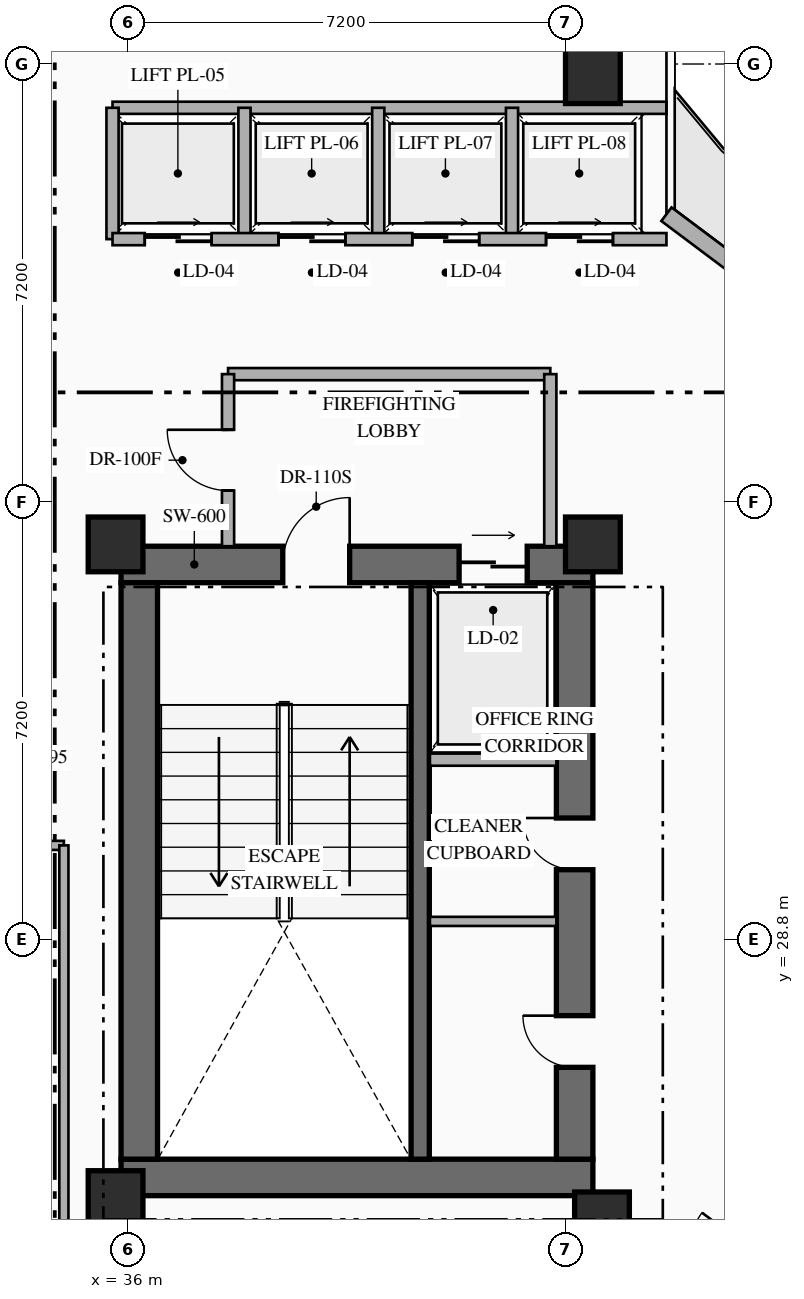
"""IFC4 building model, lengths in metres.
Left out: names, types, materials, properties, quantities, classifications, styles, units other than length and angle.
Written with IfcOpenShell. Run it as: python <this file> out.ifc"""

import sys

from ifc_helpers import new_model, si_unit, direction, frame, frame_2d, origin, origin_2d, place, context, subcontext, project, spatial, rectangle, extrude, element, fill, save


model = new_model("IFC4")
c1 = context("Model", 3, precision=1e-05, world=origin(), true_north=direction((0.0, 1.0)))
c2 = subcontext(c1, "Body", "Model", "MODEL_VIEW")
j1 = project(units=[si_unit("LENGTHUNIT", "METRE"), si_unit("PLANEANGLEUNIT", "RADIAN")], contexts=[c1])
p1 = place(None, origin())
s1 = spatial("IfcSite", under=j1, at=p1, CompositionType="ELEMENT")
p2 = place(p1, origin())
s2 = spatial("IfcBuilding", under=s1, at=p2, CompositionType="ELEMENT")
p3 = place(p2, frame((0.0, 0.0, 108.45)))
s3 = spatial("IfcBuildingStorey", under=s2, at=p3, CompositionType="ELEMENT", Elevation=108.45)
p4 = place(p3, frame((35.89, 24.89, 0.0), z_axis=(0.0, 0.0, 1.0), x_axis=(1.0, 0.0, 0.0)))
e1 = element("IfcWall", 1, at=p4, inside=s3, PredefinedType="SHEAR", context=c2, shape_type="SweptSolid", body=[
    extrude(rectangle(XDim=7.76, YDim=0.6, at=frame_2d((3.88, 0.0))), origin(), (0.0, 0.0, 1.0), 3.6),
])
p5 = place(p3, frame((35.89, 34.97, 0.0), z_axis=(0.0, 0.0, 1.0), x_axis=(1.0, 0.0, 0.0)))
e2 = element("IfcWall", 2, at=p5, inside=s3, PredefinedType="SHEAR", context=c2, shape_type="SweptSolid", body=[
    extrude(rectangle(XDim=7.76, YDim=0.6, at=frame_2d((3.88, 0.0))), origin(), (0.0, 0.0, 1.0), 3.6),
])
p6 = place(p5, frame((2.66, 0.0, 0.0)))
e3 = element("IfcOpeningElement", 3, at=p6, cuts=e2, PredefinedType="OPENING", context=c2, shape_type="SweptSolid", body=[
    extrude(rectangle(XDim=1.1, YDim=2.2, at=frame_2d((0.55, 1.1))), frame((0.0, 0.31, 0.0), z_axis=(0.0, -1.0, 0.0), x_axis=(1.0, 0.0, 0.0)), (0.0, 0.0, 1.0), 0.62),
])
p7 = place(p5, frame((5.56, 0.0, 0.0)))
e4 = element("IfcOpeningElement", 4, at=p7, cuts=e2, PredefinedType="OPENING", context=c2, shape_type="SweptSolid", body=[
    extrude(rectangle(XDim=1.12, YDim=2.15, at=frame_2d((0.56, 1.075))), frame((0.0, 0.31, 0.0), z_axis=(0.0, -1.0, 0.0), x_axis=(1.0, 0.0, 0.0)), (0.0, 0.0, 1.0), 0.62),
])
p8 = place(p3, frame((36.19, 25.19, 0.0), z_axis=(0.0, 0.0, 1.0), x_axis=(0.0, 1.0, 0.0)))
e5 = element("IfcWall", 5, at=p8, inside=s3, PredefinedType="SHEAR", context=c2, shape_type="SweptSolid", body=[
    extrude(rectangle(XDim=9.48, YDim=0.6, at=frame_2d((4.74, 0.0))), origin(), (0.0, 0.0, 1.0), 3.6),
])
p9 = place(p3, frame((43.35, 25.19, 0.0), z_axis=(0.0, 0.0, 1.0), x_axis=(0.0, 1.0, 0.0)))
e6 = element("IfcWall", 6, at=p9, inside=s3, PredefinedType="SHEAR", context=c2, shape_type="SweptSolid", body=[
    extrude(rectangle(XDim=9.48, YDim=0.6, at=frame_2d((4.74, 0.0))), origin(), (0.0, 0.0, 1.0), 3.6),
])
p10 = place(p9, frame((1.51, 0.0, 0.0)))
e7 = element("IfcOpeningElement", 7, at=p10, cuts=e6, PredefinedType="OPENING", context=c2, shape_type="SweptSolid", body=[
    extrude(rectangle(XDim=0.85, YDim=2.08, at=frame_2d((0.425, 1.04))), frame((0.0, 0.31, 0.0), z_axis=(0.0, -1.0, 0.0), x_axis=(1.0, 0.0, 0.0)), (0.0, 0.0, 1.0), 0.62),
])
p11 = place(p9, frame((4.76, 0.0, 0.0)))
e8 = element("IfcOpeningElement", 8, at=p11, cuts=e6, PredefinedType="OPENING", context=c2, shape_type="SweptSolid", body=[
    extrude(rectangle(XDim=0.85, YDim=2.08, at=frame_2d((0.425, 1.04))), frame((0.0, 0.31, 0.0), z_axis=(0.0, -1.0, 0.0), x_axis=(1.0, 0.0, 0.0)), (0.0, 0.0, 1.0), 0.62),
])
p12 = place(p3, frame((40.81, 25.19, 0.0), z_axis=(0.0, 0.0, 1.0), x_axis=(0.0, 1.0, 0.0)))
e9 = element("IfcWall", 9, at=p12, inside=s3, PredefinedType="SHEAR", context=c2, shape_type="SweptSolid", body=[
    extrude(rectangle(XDim=9.48, YDim=0.3, at=frame_2d((4.74, 0.0))), origin(), (0.0, 0.0, 1.0), 3.6),
])
for number, where, z_axis, x_axis in (
    (10, (35.8, 24.55, 0.0), (0.0, 0.0, 1.0), (1.0, 0.0, 0.0)),
    (11, (43.8, 24.2, 0.0), (0.0, 0.0, 1.0), (1.0, 0.0, 0.0)),
    (12, (35.8, 35.3, 0.0), (0.0, 0.0, 1.0), (1.0, 0.0, 0.0)),
    (13, (43.65, 35.3, 0.0), (0.0, 0.0, 1.0), (1.0, 0.0, 0.0)),
    (14, (43.65, 43.0, 0.0), (0.0, 0.0, 1.0), (1.0, 0.0, 0.0)),
):
    element("IfcColumn", number, at=place(p3, frame(where, z_axis=z_axis, x_axis=x_axis)), inside=s3, PredefinedType="COLUMN", context=c2, shape_type="SweptSolid", body=[
        extrude(rectangle(XDim=0.9, YDim=0.9, at=origin_2d()), origin(), (0.0, 0.0, 1.0), 3.6),
    ])
p13 = place(p3, frame((44.86, 40.73, 0.0), z_axis=(0.0, 0.0, 1.0), x_axis=(0.800006902154, -0.599990797017, 0.0)))
e15 = element("IfcWall", 15, at=p13, inside=s3, PredefinedType="STANDARD", context=c2, shape_type="SweptSolid", body=[
    extrude(rectangle(XDim=29.712, YDim=0.28, at=frame_2d((14.856, 0.0))), origin(), (0.0, 0.0, 1.0), 3.35),
])
p14 = place(p13, frame((14.249, 0.0, 0.0)))
e16 = element("IfcOpeningElement", 16, at=p14, cuts=e15, PredefinedType="OPENING", context=c2, shape_type="SweptSolid", body=[
    extrude(rectangle(XDim=1.1, YDim=2.2, at=frame_2d((0.55, 1.1))), frame((0.0, 0.15, 0.0), z_axis=(0.0, -1.0, 0.0), x_axis=(1.0, 0.0, 0.0)), (0.0, 0.0, 1.0), 0.3),
])
p15 = place(p13, frame((6.528, 0.0, 0.85)))
e17 = element("IfcOpeningElement", 17, at=p15, cuts=e15, PredefinedType="OPENING", context=c2, shape_type="SweptSolid", body=[
    extrude(rectangle(XDim=1.8, YDim=2.1, at=frame_2d((0.9, 1.05))), frame((0.0, 0.15, 0.0), z_axis=(0.0, -1.0, 0.0), x_axis=(1.0, 0.0, 0.0)), (0.0, 0.0, 1.0), 0.3),
])
p16 = place(p13, frame((21.384, 0.0, 0.85)))
e18 = element("IfcOpeningElement", 18, at=p16, cuts=e15, PredefinedType="OPENING", context=c2, shape_type="SweptSolid", body=[
    extrude(rectangle(XDim=1.8, YDim=2.1, at=frame_2d((0.9, 1.05))), frame((0.0, 0.15, 0.0), z_axis=(0.0, -1.0, 0.0), x_axis=(1.0, 0.0, 0.0)), (0.0, 0.0, 1.0), 0.3),
])
p17 = place(p3, frame((40.97, 31.76, 0.0), z_axis=(0.0, 0.0, 1.0), x_axis=(1.0, 0.0, 0.0)))
e19 = element("IfcWall", 19, at=p17, inside=s3, PredefinedType="STANDARD", context=c2, shape_type="SweptSolid", body=[
    extrude(rectangle(XDim=2.08, YDim=0.2, at=frame_2d((1.04, 0.0))), origin(), (0.0, 0.0, 1.0), 3.35),
])
p18 = place(p3, frame((40.97, 29.1, 0.0), z_axis=(0.0, 0.0, 1.0), x_axis=(1.0, 0.0, 0.0)))
e20 = element("IfcWall", 20, at=p18, inside=s3, PredefinedType="PARTITIONING", context=c2, shape_type="SweptSolid", body=[
    extrude(rectangle(XDim=2.08, YDim=0.15, at=frame_2d((1.04, 0.0))), origin(), (0.0, 0.0, 1.0), 3.35),
])
p19 = place(p3, frame((37.65, 38.1, 0.0), z_axis=(0.0, 0.0, 1.0), x_axis=(1.0, 0.0, 0.0)))
e21 = element("IfcWall", 21, at=p19, inside=s3, PredefinedType="STANDARD", context=c2, shape_type="SweptSolid", body=[
    extrude(rectangle(XDim=5.3, YDim=0.2, at=frame_2d((2.65, 0.0))), origin(), (0.0, 0.0, 1.0), 3.35),
])
p20 = place(p3, frame((42.95, 35.27, 0.0), z_axis=(0.0, 0.0, 1.0), x_axis=(0.0, 1.0, 0.0)))
e22 = element("IfcWall", 22, at=p20, inside=s3, PredefinedType="STANDARD", context=c2, shape_type="SweptSolid", body=[
    extrude(rectangle(XDim=2.83, YDim=0.2, at=frame_2d((1.415, 0.0))), origin(), (0.0, 0.0, 1.0), 3.35),
])
p21 = place(p3, frame((37.65, 35.27, 0.0), z_axis=(0.0, 0.0, 1.0), x_axis=(0.0, 1.0, 0.0)))
e23 = element("IfcWall", 23, at=p21, inside=s3, PredefinedType="STANDARD", context=c2, shape_type="SweptSolid", body=[
    extrude(rectangle(XDim=2.83, YDim=0.2, at=frame_2d((1.415, 0.0))), origin(), (0.0, 0.0, 1.0), 3.35),
])
p22 = place(p21, frame((0.915, 0.0, 0.0)))
e24 = element("IfcOpeningElement", 24, at=p22, cuts=e23, PredefinedType="OPENING", context=c2, shape_type="SweptSolid", body=[
    extrude(rectangle(XDim=1.0, YDim=2.2, at=frame_2d((0.5, 1.1))), frame((0.0, 0.11, 0.0), z_axis=(0.0, -1.0, 0.0), x_axis=(1.0, 0.0, 0.0)), (0.0, 0.0, 1.0), 0.22),
])
p23 = place(p3, frame((35.75, 42.48, 0.0), z_axis=(0.0, 0.0, 1.0), x_axis=(1.0, 0.0, 0.0)))
e25 = element("IfcWall", 25, at=p23, inside=s3, PredefinedType="STANDARD", context=c2, shape_type="SweptSolid", body=[
    extrude(rectangle(XDim=9.11, YDim=0.2, at=frame_2d((4.555, 0.0))), origin(), (0.0, 0.0, 1.0), 3.35),
])
for number, where, z_axis, x_axis in (
    (26, (35.75, 40.32, 0.0), (0.0, 0.0, 1.0), (0.0, 1.0, 0.0)),
    (27, (37.92, 40.32, 0.0), (0.0, 0.0, 1.0), (0.0, 1.0, 0.0)),
    (28, (40.12, 40.32, 0.0), (0.0, 0.0, 1.0), (0.0, 1.0, 0.0)),
    (29, (42.32, 40.32, 0.0), (0.0, 0.0, 1.0), (0.0, 1.0, 0.0)),
):
    element("IfcWall", number, at=place(p3, frame(where, z_axis=z_axis, x_axis=x_axis)), inside=s3, PredefinedType="STANDARD", context=c2, shape_type="SweptSolid", body=[
        extrude(rectangle(XDim=2.16, YDim=0.2, at=frame_2d((1.08, 0.0))), origin(), (0.0, 0.0, 1.0), 3.35),
    ])
p24 = place(p3, frame((35.75, 40.32, 0.0), z_axis=(0.0, 0.0, 1.0), x_axis=(1.0, 0.0, 0.0)))
e30 = element("IfcWall", 30, at=p24, inside=s3, PredefinedType="STANDARD", context=c2, shape_type="SweptSolid", body=[
    extrude(rectangle(XDim=9.11, YDim=0.2, at=frame_2d((4.555, 0.0))), origin(), (0.0, 0.0, 1.0), 3.35),
])
p25 = place(p24, frame((0.53, 0.0, 0.0)))
e31 = element("IfcOpeningElement", 31, at=p25, cuts=e30, PredefinedType="OPENING", context=c2, shape_type="SweptSolid", body=[
    extrude(rectangle(XDim=1.1, YDim=2.18, at=frame_2d((0.55, 1.09))), frame((0.0, 0.11, 0.0), z_axis=(0.0, -1.0, 0.0), x_axis=(1.0, 0.0, 0.0)), (0.0, 0.0, 1.0), 0.22),
])
p26 = place(p24, frame((2.73, 0.0, 0.0)))
e32 = element("IfcOpeningElement", 32, at=p26, cuts=e30, PredefinedType="OPENING", context=c2, shape_type="SweptSolid", body=[
    extrude(rectangle(XDim=1.1, YDim=2.18, at=frame_2d((0.55, 1.09))), frame((0.0, 0.11, 0.0), z_axis=(0.0, -1.0, 0.0), x_axis=(1.0, 0.0, 0.0)), (0.0, 0.0, 1.0), 0.22),
])
p27 = place(p24, frame((4.93, 0.0, 0.0)))
e33 = element("IfcOpeningElement", 33, at=p27, cuts=e30, PredefinedType="OPENING", context=c2, shape_type="SweptSolid", body=[
    extrude(rectangle(XDim=1.1, YDim=2.18, at=frame_2d((0.55, 1.09))), frame((0.0, 0.11, 0.0), z_axis=(0.0, -1.0, 0.0), x_axis=(1.0, 0.0, 0.0)), (0.0, 0.0, 1.0), 0.22),
])
p28 = place(p24, frame((7.13, 0.0, 0.0)))
e34 = element("IfcOpeningElement", 34, at=p28, cuts=e30, PredefinedType="OPENING", context=c2, shape_type="SweptSolid", body=[
    extrude(rectangle(XDim=1.1, YDim=2.18, at=frame_2d((0.55, 1.09))), frame((0.0, 0.11, 0.0), z_axis=(0.0, -1.0, 0.0), x_axis=(1.0, 0.0, 0.0)), (0.0, 0.0, 1.0), 0.22),
])
p29 = place(p3, frame((30.5, 30.35, 0.0), z_axis=(0.0, 0.0, 1.0), x_axis=(1.0, 0.0, 0.0)))
e35 = element("IfcWall", 35, at=p29, inside=s3, PredefinedType="PARTITIONING", context=c2, shape_type="SweptSolid", body=[
    extrude(rectangle(XDim=4.45, YDim=0.15, at=frame_2d((2.225, 0.0))), origin(), (0.0, 0.0, 1.0), 3.35),
])
p30 = place(p29, frame((2.846, 0.0, 0.0)))
e36 = element("IfcOpeningElement", 36, at=p30, cuts=e35, PredefinedType="OPENING", context=c2, shape_type="SweptSolid", body=[
    extrude(rectangle(XDim=0.95, YDim=2.15, at=frame_2d((0.475, 1.075))), frame((0.0, 0.085, 0.0), z_axis=(0.0, -1.0, 0.0), x_axis=(1.0, 0.0, 0.0)), (0.0, 0.0, 1.0), 0.17),
])
p31 = place(p3, frame((34.95, 23.2, 0.0), z_axis=(0.0, 0.0, 1.0), x_axis=(0.0, 1.0, 0.0)))
e37 = element("IfcWall", 37, at=p31, inside=s3, PredefinedType="PARTITIONING", context=c2, shape_type="SweptSolid", body=[
    extrude(rectangle(XDim=7.15, YDim=0.15, at=frame_2d((3.575, 0.0))), origin(), (0.0, 0.0, 1.0), 3.35),
])
p32 = place(p3, frame((43.04, 19.52, 0.0), z_axis=(0.0, 0.0, 1.0), x_axis=(0.600004069023, 0.799996948216, 0.0)))
e38 = element("IfcWall", 38, at=p32, inside=s3, PredefinedType="PARTITIONING", context=c2, shape_type="SweptSolid", body=[
    extrude(rectangle(XDim=9.6, YDim=0.15, at=frame_2d((4.8, 0.0))), origin(), (0.0, 0.0, 1.0), 3.35),
])
p33 = place(p32, frame((4.325, 0.0, 0.0)))
e39 = element("IfcOpeningElement", 39, at=p33, cuts=e38, PredefinedType="OPENING", context=c2, shape_type="SweptSolid", body=[
    extrude(rectangle(XDim=0.95, YDim=2.15, at=frame_2d((0.475, 1.075))), frame((0.0, 0.085, 0.0), z_axis=(0.0, -1.0, 0.0), x_axis=(1.0, 0.0, 0.0)), (0.0, 0.0, 1.0), 0.17),
])
p34 = place(p6, origin())
e40 = element("IfcDoor", 40, at=p34, inside=s3, OperationType="SINGLE_SWING_RIGHT", PredefinedType="DOOR", context=c2, shape_type="SweptSolid", body=[
    extrude(rectangle(XDim=1.1, YDim=2.2, at=frame_2d((0.55, 1.1))), frame((0.0, 0.025, 0.0), z_axis=(0.0, -1.0, 0.0), x_axis=(1.0, 0.0, 0.0)), (0.0, 0.0, 1.0), 0.05),
])
fill(e3, e40)
p35 = place(p7, origin())
e41 = element("IfcDoor", 41, at=p35, inside=s3, OperationType="SLIDING_TO_RIGHT", PredefinedType="USERDEFINED", context=c2, shape_type="SweptSolid", body=[
    extrude(rectangle(XDim=1.12, YDim=2.15, at=frame_2d((0.56, 1.075))), frame((0.0, 0.025, 0.0), z_axis=(0.0, -1.0, 0.0), x_axis=(1.0, 0.0, 0.0)), (0.0, 0.0, 1.0), 0.05),
])
fill(e4, e41)
p36 = place(p10, origin())
e42 = element("IfcDoor", 42, at=p36, inside=s3, OperationType="SINGLE_SWING_RIGHT", PredefinedType="DOOR", context=c2, shape_type="SweptSolid", body=[
    extrude(rectangle(XDim=0.85, YDim=2.08, at=frame_2d((0.425, 1.04))), frame((0.0, 0.025, 0.0), z_axis=(0.0, -1.0, 0.0), x_axis=(1.0, 0.0, 0.0)), (0.0, 0.0, 1.0), 0.05),
])
fill(e7, e42)
p37 = place(p11, origin())
e43 = element("IfcDoor", 43, at=p37, inside=s3, OperationType="SINGLE_SWING_RIGHT", PredefinedType="DOOR", context=c2, shape_type="SweptSolid", body=[
    extrude(rectangle(XDim=0.85, YDim=2.08, at=frame_2d((0.425, 1.04))), frame((0.0, 0.025, 0.0), z_axis=(0.0, -1.0, 0.0), x_axis=(1.0, 0.0, 0.0)), (0.0, 0.0, 1.0), 0.05),
])
fill(e8, e43)
p38 = place(p22, origin())
e44 = element("IfcDoor", 44, at=p38, inside=s3, OperationType="SINGLE_SWING_RIGHT", PredefinedType="DOOR", context=c2, shape_type="SweptSolid", body=[
    extrude(rectangle(XDim=1.0, YDim=2.2, at=frame_2d((0.5, 1.1))), frame((0.0, 0.025, 0.0), z_axis=(0.0, -1.0, 0.0), x_axis=(1.0, 0.0, 0.0)), (0.0, 0.0, 1.0), 0.05),
])
fill(e24, e44)
p39 = place(p25, origin())
e45 = element("IfcDoor", 45, at=p39, inside=s3, OperationType="SLIDING_TO_RIGHT", PredefinedType="USERDEFINED", context=c2, shape_type="SweptSolid", body=[
    extrude(rectangle(XDim=1.1, YDim=2.18, at=frame_2d((0.55, 1.09))), frame((0.0, 0.025, 0.0), z_axis=(0.0, -1.0, 0.0), x_axis=(1.0, 0.0, 0.0)), (0.0, 0.0, 1.0), 0.05),
])
fill(e31, e45)
p40 = place(p26, origin())
e46 = element("IfcDoor", 46, at=p40, inside=s3, OperationType="SLIDING_TO_RIGHT", PredefinedType="USERDEFINED", context=c2, shape_type="SweptSolid", body=[
    extrude(rectangle(XDim=1.1, YDim=2.18, at=frame_2d((0.55, 1.09))), frame((0.0, 0.025, 0.0), z_axis=(0.0, -1.0, 0.0), x_axis=(1.0, 0.0, 0.0)), (0.0, 0.0, 1.0), 0.05),
])
fill(e32, e46)
p41 = place(p27, origin())
e47 = element("IfcDoor", 47, at=p41, inside=s3, OperationType="SLIDING_TO_RIGHT", PredefinedType="USERDEFINED", context=c2, shape_type="SweptSolid", body=[
    extrude(rectangle(XDim=1.1, YDim=2.18, at=frame_2d((0.55, 1.09))), frame((0.0, 0.025, 0.0), z_axis=(0.0, -1.0, 0.0), x_axis=(1.0, 0.0, 0.0)), (0.0, 0.0, 1.0), 0.05),
])
fill(e33, e47)
p42 = place(p28, origin())
e48 = element("IfcDoor", 48, at=p42, inside=s3, OperationType="SLIDING_TO_RIGHT", PredefinedType="USERDEFINED", context=c2, shape_type="SweptSolid", body=[
    extrude(rectangle(XDim=1.1, YDim=2.18, at=frame_2d((0.55, 1.09))), frame((0.0, 0.025, 0.0), z_axis=(0.0, -1.0, 0.0), x_axis=(1.0, 0.0, 0.0)), (0.0, 0.0, 1.0), 0.05),
])
fill(e34, e48)
save(model, sys.argv[1])
